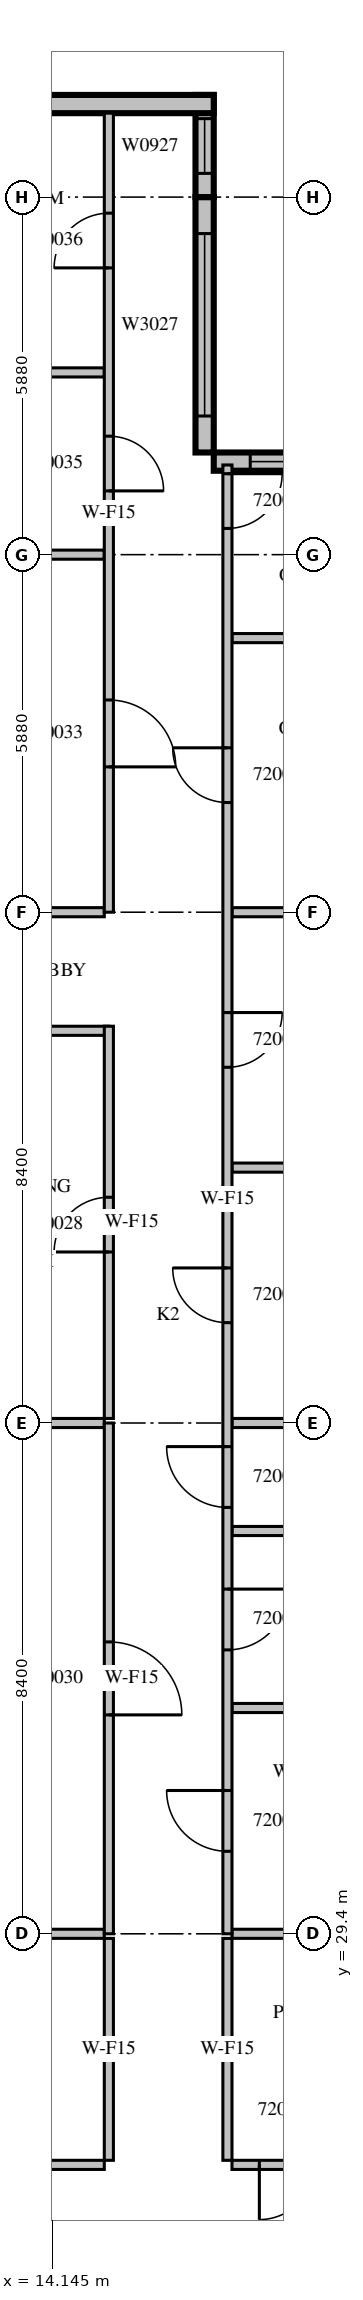
"""IFC4 building model, lengths in metres.
Left out: names, types, materials, properties, quantities, classifications, styles, units other than length and angle.
Written with IfcOpenShell. Run it as: python <this file> out.ifc"""

import sys

from ifc_helpers import new_model, si_unit, direction, frame, frame_2d, origin, place, context, subcontext, project, spatial, rectangle, extrude, source, transform, mapped, element, fill, save


model = new_model("IFC4")
c1 = context("Model", 3, precision=1e-05, world=origin(), true_north=direction((0.0, 1.0)))
c2 = subcontext(c1, "Body", "Model", "MODEL_VIEW")
j1 = project(units=[si_unit("LENGTHUNIT", "METRE"), si_unit("PLANEANGLEUNIT", "RADIAN")], contexts=[c1])
p1 = place(None, origin())
s1 = spatial("IfcSite", under=j1, at=p1, CompositionType="ELEMENT")
p2 = place(p1, origin())
s2 = spatial("IfcBuilding", under=s1, at=p2, CompositionType="ELEMENT")
p3 = place(p2, frame((0.0, 0.0, 95.1)))
s3 = spatial("IfcBuildingStorey", under=s2, at=p3, CompositionType="ELEMENT", Elevation=95.1)
m1 = source(origin(), c2, "Body", "SweptSolid", [
    extrude(rectangle(XDim=4.2, YDim=0.3, at=frame_2d((2.1, 0.0))), origin(), (0.0, 0.0, 1.0), 3.8),
])
p4 = place(p3, frame((21.0, 53.61, 0.0), z_axis=(0.0, 0.0, 1.0), x_axis=(-1.0, 0.0, 0.0)))
e1 = element("IfcWall", 1, at=p4, inside=s3, PredefinedType="STANDARD", context=c2, shape_type="MappedRepresentation", body=[
    mapped(m1, transform((0.0, 0.0, 0.0), scale=1.0)),
])
m2 = source(origin(), c2, "Body", "SweptSolid", [
    extrude(rectangle(XDim=3.0, YDim=2.7, at=frame_2d((1.5, 1.35))), frame((0.0, 0.16, 0.0), z_axis=(0.0, -1.0, 0.0), x_axis=(1.0, 0.0, 0.0)), (0.0, 0.0, 1.0), 0.32),
])
p5 = place(p4, frame((0.6, 0.0, 0.6)))
e2 = element("IfcOpeningElement", 2, at=p5, cuts=e1, PredefinedType="OPENING", context=c2, shape_type="MappedRepresentation", body=[
    mapped(m2, transform((0.0, 0.0, 0.0), scale=1.0)),
])
p6 = place(p3, frame((16.65, 53.76, 0.0), z_axis=(0.0, 0.0, 1.0), x_axis=(0.0, 1.0, 0.0)))
e3 = element("IfcWall", 3, at=p6, inside=s3, PredefinedType="STANDARD", context=c2, shape_type="MappedRepresentation", body=[
    mapped(m1, transform((0.0, 0.0, 0.0), scale=1.0)),
])
p7 = place(p6, frame((0.6, 0.0, 0.6)))
e4 = element("IfcOpeningElement", 4, at=p7, cuts=e3, PredefinedType="OPENING", context=c2, shape_type="MappedRepresentation", body=[
    mapped(m2, transform((0.0, 0.0, 0.0), scale=1.0)),
])
m3 = source(origin(), c2, "Body", "SweptSolid", [
    extrude(rectangle(XDim=1.68, YDim=0.3, at=frame_2d((0.84, 0.0))), origin(), (0.0, 0.0, 1.0), 3.8),
])
p8 = place(p3, frame((16.65, 57.96, 0.0), z_axis=(0.0, 0.0, 1.0), x_axis=(0.0, 1.0, 0.0)))
e5 = element("IfcWall", 5, at=p8, inside=s3, PredefinedType="STANDARD", context=c2, shape_type="MappedRepresentation", body=[
    mapped(m3, transform((0.0, 0.0, 0.0), scale=1.0)),
])
m4 = source(origin(), c2, "Body", "SweptSolid", [
    extrude(rectangle(XDim=0.9, YDim=2.7, at=frame_2d((0.45, 1.35))), frame((0.0, 0.16, 0.0), z_axis=(0.0, -1.0, 0.0), x_axis=(1.0, 0.0, 0.0)), (0.0, 0.0, 1.0), 0.32),
])
p9 = place(p8, frame((0.39, 0.0, 0.6)))
e6 = element("IfcOpeningElement", 6, at=p9, cuts=e5, PredefinedType="OPENING", context=c2, shape_type="MappedRepresentation", body=[
    mapped(m4, transform((0.0, 0.0, 0.0), scale=1.0)),
])
m5 = source(origin(), c2, "Body", "SweptSolid", [
    extrude(rectangle(XDim=8.4, YDim=0.3, at=frame_2d((4.2, 0.0))), origin(), (0.0, 0.0, 1.0), 3.8),
])
p10 = place(p3, frame((16.8, 59.49, 0.0), z_axis=(0.0, 0.0, 1.0), x_axis=(-1.0, 0.0, 0.0)))
e7 = element("IfcWall", 7, at=p10, inside=s3, PredefinedType="STANDARD", context=c2, shape_type="MappedRepresentation", body=[
    mapped(m5, transform((0.0, 0.0, 0.0), scale=1.0)),
])
m6 = source(origin(), c2, "Body", "SweptSolid", [
    extrude(rectangle(XDim=1.8, YDim=2.7, at=frame_2d((0.9, 1.35))), frame((0.0, 0.16, 0.0), z_axis=(0.0, -1.0, 0.0), x_axis=(1.0, 0.0, 0.0)), (0.0, 0.0, 1.0), 0.32),
])
p11 = place(p10, frame((2.775, 0.0, 0.6)))
e8 = element("IfcOpeningElement", 8, at=p11, cuts=e7, PredefinedType="OPENING", context=c2, shape_type="MappedRepresentation", body=[
    mapped(m6, transform((0.0, 0.0, 0.0), scale=1.0)),
])
p12 = place(p10, frame((5.925, 0.0, 0.6)))
e9 = element("IfcOpeningElement", 9, at=p12, cuts=e7, PredefinedType="OPENING", context=c2, shape_type="MappedRepresentation", body=[
    mapped(m6, transform((0.0, 0.0, 0.0), scale=1.0)),
])
m7 = source(origin(), c2, "Body", "SweptSolid", [
    extrude(rectangle(XDim=11.925, YDim=0.15, at=frame_2d((5.963, 0.0))), origin(), (0.0, 0.0, 1.0), 3.8),
])
p13 = place(p3, frame((3.075, 25.6, 0.0), z_axis=(0.0, 0.0, 1.0), x_axis=(1.0, 0.0, 0.0)))
e10 = element("IfcWall", 10, at=p13, inside=s3, PredefinedType="PARTITIONING", context=c2, shape_type="MappedRepresentation", body=[
    mapped(m7, transform((0.0, 0.0, 0.0), scale=1.0)),
])
m8 = source(origin(), c2, "Body", "SweptSolid", [
    extrude(rectangle(XDim=0.9, YDim=2.1, at=frame_2d((0.45, 1.05))), frame((0.0, 0.085, 0.0), z_axis=(0.0, -1.0, 0.0), x_axis=(1.0, 0.0, 0.0)), (0.0, 0.0, 1.0), 0.17),
])
p14 = place(p13, frame((1.462, 0.0, 0.0)))
e11 = element("IfcOpeningElement", 11, at=p14, cuts=e10, PredefinedType="OPENING", context=c2, shape_type="MappedRepresentation", body=[
    mapped(m8, transform((0.0, 0.0, 0.0), scale=1.0)),
])
p15 = place(p13, frame((8.3, 0.0, 0.0)))
e12 = element("IfcOpeningElement", 12, at=p15, cuts=e10, PredefinedType="OPENING", context=c2, shape_type="MappedRepresentation", body=[
    mapped(m8, transform((0.0, 0.0, 0.0), scale=1.0)),
])
m9 = source(origin(), c2, "Body", "SweptSolid", [
    extrude(rectangle(XDim=3.6, YDim=0.15, at=frame_2d((1.8, 0.0))), origin(), (0.0, 0.0, 1.0), 3.8),
])
p16 = place(p3, frame((17.1, 25.6, 0.0), z_axis=(0.0, 0.0, 1.0), x_axis=(1.0, 0.0, 0.0)))
e13 = element("IfcWall", 13, at=p16, inside=s3, PredefinedType="PARTITIONING", context=c2, shape_type="MappedRepresentation", body=[
    mapped(m9, transform((0.0, 0.0, 0.0), scale=1.0)),
])
p17 = place(p16, frame((0.45, 0.0, 0.0)))
e14 = element("IfcOpeningElement", 14, at=p17, cuts=e13, PredefinedType="OPENING", context=c2, shape_type="MappedRepresentation", body=[
    mapped(m8, transform((0.0, 0.0, 0.0), scale=1.0)),
])
m10 = source(origin(), c2, "Body", "SweptSolid", [
    extrude(rectangle(XDim=3.65, YDim=0.15, at=frame_2d((1.825, 0.0))), origin(), (0.0, 0.0, 1.0), 3.8),
])
for number, where, z_axis, x_axis in (
    (15, (15.075, 25.675, 0.0), (0.0, 0.0, 1.0), (0.0, 1.0, 0.0)),
    (16, (17.025, 29.325, 0.0), (0.0, 0.0, 1.0), (0.0, -1.0, 0.0)),
):
    element("IfcWall", number, at=place(p3, frame(where, z_axis=z_axis, x_axis=x_axis)), inside=s3, PredefinedType="PARTITIONING", context=c2, shape_type="MappedRepresentation", body=[
        mapped(m10, transform((0.0, 0.0, 0.0), scale=1.0)),
    ])
m11 = source(origin(), c2, "Body", "SweptSolid", [
    extrude(rectangle(XDim=3.901, YDim=0.15, at=frame_2d((1.95, 0.0))), origin(), (0.0, 0.0, 1.0), 3.8),
])
p18 = place(p3, frame((15.0, 29.4, 0.0), z_axis=(0.0, 0.0, 1.0), x_axis=(-1.0, 0.0, 0.0)))
e17 = element("IfcWall", 17, at=p18, inside=s3, PredefinedType="PARTITIONING", context=c2, shape_type="MappedRepresentation", body=[
    mapped(m11, transform((0.0, 0.0, 0.0), scale=1.0)),
])
m12 = source(origin(), c2, "Body", "SweptSolid", [
    extrude(rectangle(XDim=2.701, YDim=0.15, at=frame_2d((1.351, 0.0))), origin(), (0.0, 0.0, 1.0), 3.8),
])
p19 = place(p3, frame((19.801, 29.4, 0.0), z_axis=(0.0, 0.0, 1.0), x_axis=(-1.0, 0.0, 0.0)))
e18 = element("IfcWall", 18, at=p19, inside=s3, PredefinedType="PARTITIONING", context=c2, shape_type="MappedRepresentation", body=[
    mapped(m12, transform((0.0, 0.0, 0.0), scale=1.0)),
])
m13 = source(origin(), c2, "Body", "SweptSolid", [
    extrude(rectangle(XDim=2.775, YDim=0.15, at=frame_2d((1.387, 0.0))), origin(), (0.0, 0.0, 1.0), 3.8),
])
p20 = place(p3, frame((15.075, 44.25, 0.0), z_axis=(0.0, 0.0, 1.0), x_axis=(-1.0, 0.0, 0.0)))
e19 = element("IfcWall", 19, at=p20, inside=s3, PredefinedType="PARTITIONING", context=c2, shape_type="MappedRepresentation", body=[
    mapped(m13, transform((0.0, 0.0, 0.0), scale=1.0)),
])
m14 = source(origin(), c2, "Body", "SweptSolid", [
    extrude(rectangle(XDim=6.45, YDim=0.15, at=frame_2d((3.225, 0.0))), origin(), (0.0, 0.0, 1.0), 3.8),
])
p21 = place(p3, frame((15.075, 37.875, 0.0), z_axis=(0.0, 0.0, 1.0), x_axis=(0.0, 1.0, 0.0)))
e20 = element("IfcWall", 20, at=p21, inside=s3, PredefinedType="PARTITIONING", context=c2, shape_type="MappedRepresentation", body=[
    mapped(m14, transform((0.0, 0.0, 0.0), scale=1.0)),
])
p22 = place(p21, frame((2.737, 0.0, 0.0)))
e21 = element("IfcOpeningElement", 21, at=p22, cuts=e20, PredefinedType="OPENING", context=c2, shape_type="MappedRepresentation", body=[
    mapped(m8, transform((0.0, 0.0, 0.0), scale=1.0)),
])
m15 = source(origin(), c2, "Body", "SweptSolid", [
    extrude(rectangle(XDim=3.75, YDim=0.15, at=frame_2d((1.875, 0.0))), origin(), (0.0, 0.0, 1.0), 3.8),
])
for number, where, z_axis, x_axis in (
    (22, (15.0, 37.8, 0.0), (0.0, 0.0, 1.0), (-1.0, 0.0, 0.0)),
    (23, (15.0, 52.08, 0.0), (0.0, 0.0, 1.0), (-1.0, 0.0, 0.0)),
    (24, (15.0, 55.077, 0.0), (0.0, 0.0, 1.0), (-1.0, 0.0, 0.0)),
    (25, (15.0, 46.2, 0.0), (0.0, 0.0, 1.0), (-1.0, 0.0, 0.0)),
):
    element("IfcWall", number, at=place(p3, frame(where, z_axis=z_axis, x_axis=x_axis)), inside=s3, PredefinedType="PARTITIONING", context=c2, shape_type="MappedRepresentation", body=[
        mapped(m15, transform((0.0, 0.0, 0.0), scale=1.0)),
    ])
for number, where, z_axis, x_axis in (
    (26, (17.1, 33.113, 0.0), (0.0, 0.0, 1.0), (1.0, 0.0, 0.0)),
    (27, (17.1, 36.024, 0.0), (0.0, 0.0, 1.0), (1.0, 0.0, 0.0)),
    (28, (17.1, 42.0, 0.0), (0.0, 0.0, 1.0), (1.0, 0.0, 0.0)),
    (29, (17.1, 50.708, 0.0), (0.0, 0.0, 1.0), (1.0, 0.0, 0.0)),
):
    element("IfcWall", number, at=place(p3, frame(where, z_axis=z_axis, x_axis=x_axis)), inside=s3, PredefinedType="PARTITIONING", context=c2, shape_type="MappedRepresentation", body=[
        mapped(m9, transform((0.0, 0.0, 0.0), scale=1.0)),
    ])
for number, where, z_axis, x_axis in (
    (30, (19.801, 37.8, 0.0), (0.0, 0.0, 1.0), (-1.0, 0.0, 0.0)),
    (31, (19.801, 46.2, 0.0), (0.0, 0.0, 1.0), (-1.0, 0.0, 0.0)),
):
    element("IfcWall", number, at=place(p3, frame(where, z_axis=z_axis, x_axis=x_axis)), inside=s3, PredefinedType="PARTITIONING", context=c2, shape_type="MappedRepresentation", body=[
        mapped(m12, transform((0.0, 0.0, 0.0), scale=1.0)),
    ])
m16 = source(origin(), c2, "Body", "SweptSolid", [
    extrude(rectangle(XDim=8.4, YDim=0.15, at=frame_2d((4.2, 0.0))), origin(), (0.0, 0.0, 1.0), 3.8),
])
p23 = place(p3, frame((15.075, 29.4, 0.0), z_axis=(0.0, 0.0, 1.0), x_axis=(0.0, 1.0, 0.0)))
e32 = element("IfcWall", 32, at=p23, inside=s3, PredefinedType="PARTITIONING", context=c2, shape_type="MappedRepresentation", body=[
    mapped(m16, transform((0.0, 0.0, 0.0), scale=1.0)),
])
m17 = source(origin(), c2, "Body", "SweptSolid", [
    extrude(rectangle(XDim=1.2, YDim=2.1, at=frame_2d((0.6, 1.05))), frame((0.0, 0.085, 0.0), z_axis=(0.0, -1.0, 0.0), x_axis=(1.0, 0.0, 0.0)), (0.0, 0.0, 1.0), 0.17),
])
p24 = place(p23, frame((3.6, 0.0, 0.0)))
e33 = element("IfcOpeningElement", 33, at=p24, cuts=e32, PredefinedType="OPENING", context=c2, shape_type="MappedRepresentation", body=[
    mapped(m17, transform((0.0, 0.0, 0.0), scale=1.0)),
])
m18 = source(origin(), c2, "Body", "SweptSolid", [
    extrude(rectangle(XDim=13.14, YDim=0.15, at=frame_2d((6.57, 0.0))), origin(), (0.0, 0.0, 1.0), 3.8),
])
p25 = place(p3, frame((15.075, 46.2, 0.0), z_axis=(0.0, 0.0, 1.0), x_axis=(0.0, 1.0, 0.0)))
e34 = element("IfcWall", 34, at=p25, inside=s3, PredefinedType="PARTITIONING", context=c2, shape_type="MappedRepresentation", body=[
    mapped(m18, transform((0.0, 0.0, 0.0), scale=1.0)),
])
m19 = source(origin(), c2, "Body", "SweptSolid", [
    extrude(rectangle(XDim=1.1, YDim=2.1, at=frame_2d((0.55, 1.05))), frame((0.0, 0.085, 0.0), z_axis=(0.0, -1.0, 0.0), x_axis=(1.0, 0.0, 0.0)), (0.0, 0.0, 1.0), 0.17),
])
p26 = place(p25, frame((2.39, 0.0, 0.0)))
e35 = element("IfcOpeningElement", 35, at=p26, cuts=e34, PredefinedType="OPENING", context=c2, shape_type="MappedRepresentation", body=[
    mapped(m19, transform((0.0, 0.0, 0.0), scale=1.0)),
])
p27 = place(p25, frame((6.928, 0.0, 0.0)))
e36 = element("IfcOpeningElement", 36, at=p27, cuts=e34, PredefinedType="OPENING", context=c2, shape_type="MappedRepresentation", body=[
    mapped(m8, transform((0.0, 0.0, 0.0), scale=1.0)),
])
p28 = place(p25, frame((10.596, 0.0, 0.0)))
e37 = element("IfcOpeningElement", 37, at=p28, cuts=e34, PredefinedType="OPENING", context=c2, shape_type="MappedRepresentation", body=[
    mapped(m8, transform((0.0, 0.0, 0.0), scale=1.0)),
])
m20 = source(origin(), c2, "Body", "SweptSolid", [
    extrude(rectangle(XDim=24.155, YDim=0.15, at=frame_2d((12.078, 0.0))), origin(), (0.0, 0.0, 1.0), 3.8),
])
p29 = place(p3, frame((17.025, 53.555, 0.0), z_axis=(0.0, 0.0, 1.0), x_axis=(0.0, -1.0, 0.0)))
e38 = element("IfcWall", 38, at=p29, inside=s3, PredefinedType="PARTITIONING", context=c2, shape_type="MappedRepresentation", body=[
    mapped(m20, transform((0.0, 0.0, 0.0), scale=1.0)),
])
m21 = source(origin(), c2, "Body", "SweptSolid", [
    extrude(rectangle(XDim=1.0, YDim=2.1, at=frame_2d((0.5, 1.05))), frame((0.0, 0.085, 0.0), z_axis=(0.0, -1.0, 0.0), x_axis=(1.0, 0.0, 0.0)), (0.0, 0.0, 1.0), 0.17),
])
p30 = place(p29, frame((21.798, 0.0, 0.0)))
e39 = element("IfcOpeningElement", 39, at=p30, cuts=e38, PredefinedType="OPENING", context=c2, shape_type="MappedRepresentation", body=[
    mapped(m21, transform((0.0, 0.0, 0.0), scale=1.0)),
])
p31 = place(p29, frame((18.486, 0.0, 0.0)))
e40 = element("IfcOpeningElement", 40, at=p31, cuts=e38, PredefinedType="OPENING", context=c2, shape_type="MappedRepresentation", body=[
    mapped(m21, transform((0.0, 0.0, 0.0), scale=1.0)),
])
p32 = place(p29, frame((16.143, 0.0, 0.0)))
e41 = element("IfcOpeningElement", 41, at=p32, cuts=e38, PredefinedType="OPENING", context=c2, shape_type="MappedRepresentation", body=[
    mapped(m21, transform((0.0, 0.0, 0.0), scale=1.0)),
])
p33 = place(p29, frame((13.205, 0.0, 0.0)))
e42 = element("IfcOpeningElement", 42, at=p33, cuts=e38, PredefinedType="OPENING", context=c2, shape_type="MappedRepresentation", body=[
    mapped(m8, transform((0.0, 0.0, 0.0), scale=1.0)),
])
p34 = place(p29, frame((9.005, 0.0, 0.0)))
e43 = element("IfcOpeningElement", 43, at=p34, cuts=e38, PredefinedType="OPENING", context=c2, shape_type="MappedRepresentation", body=[
    mapped(m8, transform((0.0, 0.0, 0.0), scale=1.0)),
])
p35 = place(p29, frame((4.651, 0.0, 0.0)))
e44 = element("IfcOpeningElement", 44, at=p35, cuts=e38, PredefinedType="OPENING", context=c2, shape_type="MappedRepresentation", body=[
    mapped(m8, transform((0.0, 0.0, 0.0), scale=1.0)),
])
p36 = place(p29, frame((0.144, 0.0, 0.0)))
e45 = element("IfcOpeningElement", 45, at=p36, cuts=e38, PredefinedType="OPENING", context=c2, shape_type="MappedRepresentation", body=[
    mapped(m8, transform((0.0, 0.0, 0.0), scale=1.0)),
])
m22 = source(origin(), c2, "Body", "SweptSolid", [
    extrude(rectangle(XDim=3.0, YDim=2.7, at=frame_2d((1.5, 1.35))), frame((0.0, 0.03, 0.0), z_axis=(0.0, -1.0, 0.0), x_axis=(1.0, 0.0, 0.0)), (0.0, 0.0, 1.0), 0.06),
])
p37 = place(p5, origin())
e46 = element("IfcWindow", 46, at=p37, inside=s3, PartitioningType="SINGLE_PANEL", PredefinedType="WINDOW", context=c2, shape_type="MappedRepresentation", body=[
    mapped(m22, transform((0.0, 0.0, 0.0), scale=1.0)),
])
fill(e2, e46)
p38 = place(p7, origin())
e47 = element("IfcWindow", 47, at=p38, inside=s3, PartitioningType="SINGLE_PANEL", PredefinedType="WINDOW", context=c2, shape_type="MappedRepresentation", body=[
    mapped(m22, transform((0.0, 0.0, 0.0), scale=1.0)),
])
fill(e4, e47)
m23 = source(origin(), c2, "Body", "SweptSolid", [
    extrude(rectangle(XDim=0.9, YDim=2.7, at=frame_2d((0.45, 1.35))), frame((0.0, 0.03, 0.0), z_axis=(0.0, -1.0, 0.0), x_axis=(1.0, 0.0, 0.0)), (0.0, 0.0, 1.0), 0.06),
])
p39 = place(p9, origin())
e48 = element("IfcWindow", 48, at=p39, inside=s3, PartitioningType="SINGLE_PANEL", PredefinedType="WINDOW", context=c2, shape_type="MappedRepresentation", body=[
    mapped(m23, transform((0.0, 0.0, 0.0), scale=1.0)),
])
fill(e6, e48)
m24 = source(origin(), c2, "Body", "SweptSolid", [
    extrude(rectangle(XDim=0.9, YDim=2.1, at=frame_2d((0.45, 1.05))), frame((0.0, 0.025, 0.0), z_axis=(0.0, -1.0, 0.0), x_axis=(1.0, 0.0, 0.0)), (0.0, 0.0, 1.0), 0.05),
])
p40 = place(p17, origin())
e49 = element("IfcDoor", 49, at=p40, inside=s3, OperationType="SINGLE_SWING_RIGHT", PredefinedType="DOOR", context=c2, shape_type="MappedRepresentation", body=[
    mapped(m24, transform((0.0, 0.0, 0.0), scale=1.0)),
])
fill(e14, e49)
p41 = place(p22, origin())
e50 = element("IfcDoor", 50, at=p41, inside=s3, OperationType="SINGLE_SWING_LEFT", PredefinedType="DOOR", context=c2, shape_type="MappedRepresentation", body=[
    mapped(m24, transform((0.0, 0.0, 0.0), scale=1.0)),
])
fill(e21, e50)
m25 = source(origin(), c2, "Body", "SweptSolid", [
    extrude(rectangle(XDim=1.2, YDim=2.1, at=frame_2d((0.6, 1.05))), frame((0.0, 0.025, 0.0), z_axis=(0.0, -1.0, 0.0), x_axis=(1.0, 0.0, 0.0)), (0.0, 0.0, 1.0), 0.05),
])
p42 = place(p24, origin())
e51 = element("IfcDoor", 51, at=p42, inside=s3, OperationType="SINGLE_SWING_RIGHT", PredefinedType="DOOR", context=c2, shape_type="MappedRepresentation", body=[
    mapped(m25, transform((0.0, 0.0, 0.0), scale=1.0)),
])
fill(e33, e51)
m26 = source(origin(), c2, "Body", "SweptSolid", [
    extrude(rectangle(XDim=1.1, YDim=2.1, at=frame_2d((0.55, 1.05))), frame((0.0, 0.025, 0.0), z_axis=(0.0, -1.0, 0.0), x_axis=(1.0, 0.0, 0.0)), (0.0, 0.0, 1.0), 0.05),
])
p43 = place(p26, origin())
e52 = element("IfcDoor", 52, at=p43, inside=s3, OperationType="SINGLE_SWING_RIGHT", PredefinedType="DOOR", context=c2, shape_type="MappedRepresentation", body=[
    mapped(m26, transform((0.0, 0.0, 0.0), scale=1.0)),
])
fill(e35, e52)
p44 = place(p27, origin())
e53 = element("IfcDoor", 53, at=p44, inside=s3, OperationType="SINGLE_SWING_RIGHT", PredefinedType="DOOR", context=c2, shape_type="MappedRepresentation", body=[
    mapped(m24, transform((0.0, 0.0, 0.0), scale=1.0)),
])
fill(e36, e53)
p45 = place(p28, origin())
e54 = element("IfcDoor", 54, at=p45, inside=s3, OperationType="SINGLE_SWING_LEFT", PredefinedType="DOOR", context=c2, shape_type="MappedRepresentation", body=[
    mapped(m24, transform((0.0, 0.0, 0.0), scale=1.0)),
])
fill(e37, e54)
m27 = source(origin(), c2, "Body", "SweptSolid", [
    extrude(rectangle(XDim=1.0, YDim=2.1, at=frame_2d((0.5, 1.05))), frame((0.0, 0.025, 0.0), z_axis=(0.0, -1.0, 0.0), x_axis=(1.0, 0.0, 0.0)), (0.0, 0.0, 1.0), 0.05),
])
p46 = place(p30, origin())
e55 = element("IfcDoor", 55, at=p46, inside=s3, OperationType="SINGLE_SWING_RIGHT", PredefinedType="DOOR", context=c2, shape_type="MappedRepresentation", body=[
    mapped(m27, transform((0.0, 0.0, 0.0), scale=1.0)),
])
fill(e39, e55)
p47 = place(p31, origin())
e56 = element("IfcDoor", 56, at=p47, inside=s3, OperationType="SINGLE_SWING_LEFT", PredefinedType="DOOR", context=c2, shape_type="MappedRepresentation", body=[
    mapped(m27, transform((0.0, 0.0, 0.0), scale=1.0)),
])
fill(e40, e56)
p48 = place(p32, origin())
e57 = element("IfcDoor", 57, at=p48, inside=s3, OperationType="SINGLE_SWING_RIGHT", PredefinedType="DOOR", context=c2, shape_type="MappedRepresentation", body=[
    mapped(m27, transform((0.0, 0.0, 0.0), scale=1.0)),
])
fill(e41, e57)
p49 = place(p33, origin())
e58 = element("IfcDoor", 58, at=p49, inside=s3, OperationType="SINGLE_SWING_RIGHT", PredefinedType="DOOR", context=c2, shape_type="MappedRepresentation", body=[
    mapped(m24, transform((0.0, 0.0, 0.0), scale=1.0)),
])
fill(e42, e58)
p50 = place(p34, origin())
e59 = element("IfcDoor", 59, at=p50, inside=s3, OperationType="SINGLE_SWING_LEFT", PredefinedType="DOOR", context=c2, shape_type="MappedRepresentation", body=[
    mapped(m24, transform((0.0, 0.0, 0.0), scale=1.0)),
])
fill(e43, e59)
p51 = place(p35, origin())
e60 = element("IfcDoor", 60, at=p51, inside=s3, OperationType="SINGLE_SWING_RIGHT", PredefinedType="DOOR", context=c2, shape_type="MappedRepresentation", body=[
    mapped(m24, transform((0.0, 0.0, 0.0), scale=1.0)),
])
fill(e44, e60)
p52 = place(p36, origin())
e61 = element("IfcDoor", 61, at=p52, inside=s3, OperationType="SINGLE_SWING_LEFT", PredefinedType="DOOR", context=c2, shape_type="MappedRepresentation", body=[
    mapped(m24, transform((0.0, 0.0, 0.0), scale=1.0)),
])
fill(e45, e61)
save(model, sys.argv[1])
